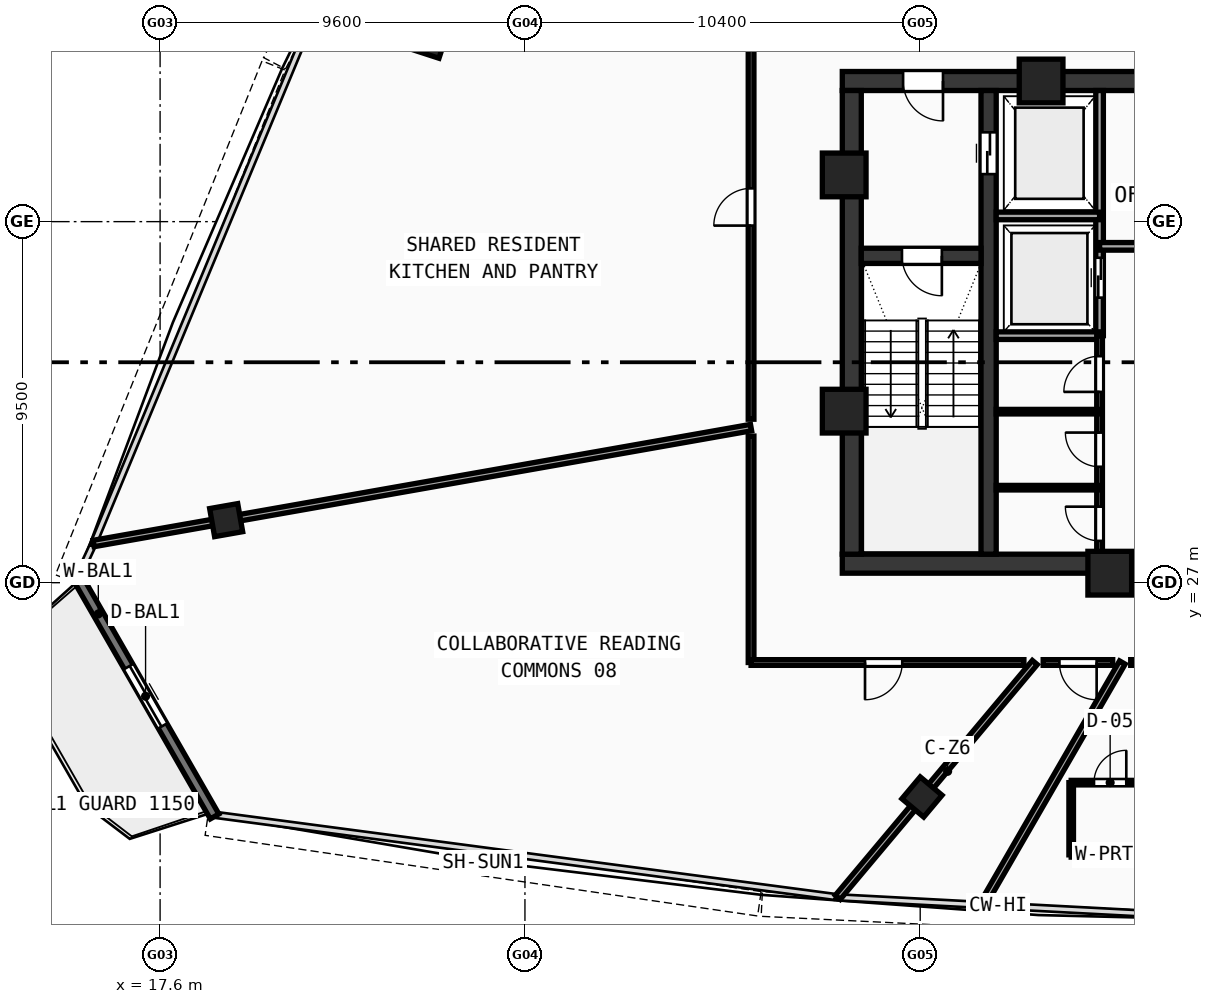
"""IFC4 building model, lengths in metres.
Left out: names, types, materials, properties, quantities, classifications, styles, units other than length and angle.
Written with IfcOpenShell. Run it as: python <this file> out.ifc"""

import sys

from ifc_helpers import new_model, si_unit, direction, frame, frame_2d, origin, origin_with_axes, origin_2d, place, context, subcontext, project, spatial, rectangle, hollow_rectangle, extrude, source, transform, mapped, element, fill, save


model = new_model("IFC4")
c1 = context("Model", 3, precision=1e-05, world=origin(), true_north=direction((0.0, 1.0)))
c2 = subcontext(c1, "Body", "Model", "MODEL_VIEW")
j1 = project(units=[si_unit("LENGTHUNIT", "METRE"), si_unit("PLANEANGLEUNIT", "RADIAN")], contexts=[c1])
p1 = place(None, origin())
s1 = spatial("IfcSite", under=j1, at=p1, CompositionType="ELEMENT")
p2 = place(p1, origin())
s2 = spatial("IfcBuilding", under=s1, at=p2, CompositionType="ELEMENT")
p3 = place(p2, frame((0.0, 0.0, 285.02)))
s3 = spatial("IfcBuildingStorey", under=s2, at=p3, CompositionType="ELEMENT", Elevation=285.02)
p4 = place(p3, frame((35.55, 27.5, 0.0), z_axis=(0.0, 0.0, 1.0), x_axis=(1.0, 0.0, 0.0)))
e1 = element("IfcWall", 1, at=p4, inside=s3, PredefinedType="SHEAR", context=c2, shape_type="SweptSolid", body=[
    extrude(rectangle(XDim=24.9, YDim=0.5, at=frame_2d((12.45, 0.0))), origin(), (0.0, 0.0, 1.0), 3.47),
])
p5 = place(p3, frame((35.55, 40.2, 0.0), z_axis=(0.0, 0.0, 1.0), x_axis=(1.0, 0.0, 0.0)))
e2 = element("IfcWall", 2, at=p5, inside=s3, PredefinedType="SHEAR", context=c2, shape_type="SweptSolid", body=[
    extrude(rectangle(XDim=11.25, YDim=0.5, at=frame_2d((5.625, 0.0))), origin(), (0.0, 0.0, 1.0), 3.47),
])
p6 = place(p5, frame((1.6, 0.0, 0.0)))
e3 = element("IfcOpeningElement", 3, at=p6, cuts=e2, PredefinedType="OPENING", context=c2, shape_type="SweptSolid", body=[
    extrude(rectangle(XDim=1.05, YDim=2.1, at=frame_2d((0.525, 1.05))), frame((0.0, 0.26, 0.0), z_axis=(0.0, -1.0, 0.0), x_axis=(1.0, 0.0, 0.0)), (0.0, 0.0, 1.0), 0.52),
])
p7 = place(p3, frame((35.8, 27.75, 0.0), z_axis=(0.0, 0.0, 1.0), x_axis=(0.0, 1.0, 0.0)))
e4 = element("IfcWall", 4, at=p7, inside=s3, PredefinedType="SHEAR", context=c2, shape_type="SweptSolid", body=[
    extrude(rectangle(XDim=12.2, YDim=0.5, at=frame_2d((6.1, 0.0))), origin(), (0.0, 0.0, 1.0), 3.47),
])
p8 = place(p3, frame((39.4, 27.75, 0.0), z_axis=(0.0, 0.0, 1.0), x_axis=(0.0, 1.0, 0.0)))
e5 = element("IfcWall", 5, at=p8, inside=s3, PredefinedType="SHEAR", context=c2, shape_type="SweptSolid", body=[
    extrude(rectangle(XDim=12.2, YDim=0.4, at=frame_2d((6.1, 0.0))), origin(), (0.0, 0.0, 1.0), 3.47),
])
p9 = place(p8, frame((10.0, 0.0, 0.0)))
e6 = element("IfcOpeningElement", 6, at=p9, cuts=e5, PredefinedType="OPENING", context=c2, shape_type="SweptSolid", body=[
    extrude(rectangle(XDim=1.1, YDim=2.1, at=frame_2d((0.55, 1.05))), frame((0.0, 0.21, 0.0), z_axis=(0.0, -1.0, 0.0), x_axis=(1.0, 0.0, 0.0)), (0.0, 0.0, 1.0), 0.42),
])
p10 = place(p3, frame((36.05, 35.6, 0.0), z_axis=(0.0, 0.0, 1.0), x_axis=(1.0, 0.0, 0.0)))
e7 = element("IfcWall", 7, at=p10, inside=s3, PredefinedType="SHEAR", context=c2, shape_type="SweptSolid", body=[
    extrude(rectangle(XDim=3.15, YDim=0.4, at=frame_2d((1.575, 0.0))), origin(), (0.0, 0.0, 1.0), 3.47),
])
p11 = place(p10, frame((1.07, 0.0, 0.0)))
e8 = element("IfcOpeningElement", 8, at=p11, cuts=e7, PredefinedType="OPENING", context=c2, shape_type="SweptSolid", body=[
    extrude(rectangle(XDim=1.05, YDim=2.1, at=frame_2d((0.525, 1.05))), frame((0.0, 0.21, 0.0), z_axis=(0.0, -1.0, 0.0), x_axis=(1.0, 0.0, 0.0)), (0.0, 0.0, 1.0), 0.42),
])
m1 = source(origin(), c2, "Body", "SweptSolid", [
    extrude(hollow_rectangle(XDim=1.15, YDim=1.15, WallThickness=0.048, at=origin_2d()), origin(), (0.0, 0.0, 1.0), 3.73),
])
for number, where, z_axis, x_axis in (
    (9, (42.588, 27.25, -0.26), (0.0, 0.0, 1.0), (1.0, 0.0, 0.0)),
    (10, (40.781, 40.2, -0.26), (0.0, 0.0, 1.0), (1.0, 0.0, 0.0)),
    (11, (35.6, 37.729, -0.26), (0.0, 0.0, 1.0), (1.0, 0.0, 0.0)),
    (12, (35.6, 31.513, -0.26), (0.0, 0.0, 1.0), (1.0, 0.0, 0.0)),
):
    element("IfcColumn", number, at=place(p3, frame(where, z_axis=z_axis, x_axis=x_axis)), inside=s3, PredefinedType="COLUMN", context=c2, shape_type="MappedRepresentation", body=[
        mapped(m1, transform((0.0, 0.0, 0.0), scale=1.0)),
    ])
m2 = source(origin(), c2, "Body", "SweptSolid", [
    extrude(hollow_rectangle(XDim=0.75, YDim=0.75, WallThickness=0.028, at=origin_2d()), origin(), (0.0, 0.0, 1.0), 3.73),
])
for number, where, z_axis, x_axis in (
    (13, (37.647, 21.362, -0.26), (0.0, 0.0, 1.0), (0.766, -0.643, 0.0)),
    (14, (24.698, 41.271, -0.26), (0.0, 0.0, 1.0), (-0.309, -0.951, 0.0)),
    (15, (19.338, 28.646, -0.26), (0.0, 0.0, 1.0), (0.174, -0.985, 0.0)),
):
    element("IfcColumn", number, at=place(p3, frame(where, z_axis=z_axis, x_axis=x_axis)), inside=s3, PredefinedType="COLUMN", context=c2, shape_type="MappedRepresentation", body=[
        mapped(m2, transform((0.0, 0.0, 0.0), scale=1.0)),
    ])
p12 = place(p3, frame((15.402, 27.174, 0.0), z_axis=(0.0, 0.0, 1.0), x_axis=(0.497929527106, -0.867217496385, 0.0)))
e16 = element("IfcWall", 16, at=p12, inside=s3, PredefinedType="STANDARD", context=c2, shape_type="SweptSolid", body=[
    extrude(rectangle(XDim=7.293, YDim=0.26, at=frame_2d((3.647, 0.0))), origin(), (0.0, 0.0, 1.0), 3.47),
])
p13 = place(p12, frame((2.747, 0.0, 0.0)))
e17 = element("IfcOpeningElement", 17, at=p13, cuts=e16, PredefinedType="OPENING", context=c2, shape_type="SweptSolid", body=[
    extrude(rectangle(XDim=1.8, YDim=2.15, at=frame_2d((0.9, 1.075))), frame((0.0, 0.14, 0.0), z_axis=(0.0, -1.0, 0.0), x_axis=(1.0, 0.0, 0.0)), (0.0, 0.0, 1.0), 0.28),
])
p14 = place(p3, frame((42.32, 33.5, 0.0), z_axis=(0.0, 0.0, 1.0), x_axis=(0.0, 1.0, 0.0)))
e18 = element("IfcWall", 18, at=p14, inside=s3, PredefinedType="SOLIDWALL", context=c2, shape_type="SweptSolid", body=[
    extrude(rectangle(XDim=6.45, YDim=0.2, at=frame_2d((3.225, 0.0))), origin(), (0.0, 0.0, 1.0), 3.47),
])
p15 = place(p14, frame((1.0, 0.0, 0.0)))
e19 = element("IfcOpeningElement", 19, at=p15, cuts=e18, PredefinedType="OPENING", context=c2, shape_type="SweptSolid", body=[
    extrude(rectangle(XDim=1.05, YDim=2.1, at=frame_2d((0.525, 1.05))), frame((0.0, 0.11, 0.0), z_axis=(0.0, -1.0, 0.0), x_axis=(1.0, 0.0, 0.0)), (0.0, 0.0, 1.0), 0.22),
])
for number, where, z_axis, x_axis in (
    (20, (39.6, 36.65, 0.0), (0.0, 0.0, 1.0), (1.0, 0.0, 0.0)),
    (21, (39.6, 33.5, 0.0), (0.0, 0.0, 1.0), (1.0, 0.0, 0.0)),
):
    element("IfcWall", number, at=place(p3, frame(where, z_axis=z_axis, x_axis=x_axis)), inside=s3, PredefinedType="SOLIDWALL", context=c2, shape_type="SweptSolid", body=[
        extrude(rectangle(XDim=2.72, YDim=0.2, at=frame_2d((1.36, 0.0))), origin(), (0.0, 0.0, 1.0), 3.47),
    ])
p16 = place(p3, frame((42.32, 35.85, 0.0), z_axis=(0.0, 0.0, 1.0), x_axis=(1.0, 0.0, 0.0)))
e22 = element("IfcWall", 22, at=p16, inside=s3, PredefinedType="SOLIDWALL", context=c2, shape_type="SweptSolid", body=[
    extrude(rectangle(XDim=4.73, YDim=0.2, at=frame_2d((2.365, 0.0))), origin(), (0.0, 0.0, 1.0), 3.47),
])
p17 = place(p16, frame((1.8, 0.0, 0.0)))
e23 = element("IfcOpeningElement", 23, at=p17, cuts=e22, PredefinedType="OPENING", context=c2, shape_type="SweptSolid", body=[
    extrude(rectangle(XDim=0.9, YDim=2.1, at=frame_2d((0.45, 1.05))), frame((0.0, 0.11, 0.0), z_axis=(0.0, -1.0, 0.0), x_axis=(1.0, 0.0, 0.0)), (0.0, 0.0, 1.0), 0.22),
])
p18 = place(p3, frame((42.32, 27.6, 0.0), z_axis=(0.0, 0.0, 1.0), x_axis=(0.0, 1.0, 0.0)))
e24 = element("IfcWall", 24, at=p18, inside=s3, PredefinedType="PARTITIONING", context=c2, shape_type="SweptSolid", body=[
    extrude(rectangle(XDim=5.9, YDim=0.15, at=frame_2d((2.95, 0.0))), origin(), (0.0, 0.0, 1.0), 3.47),
])
p19 = place(p18, frame((0.5, 0.0, 0.0)))
e25 = element("IfcOpeningElement", 25, at=p19, cuts=e24, PredefinedType="OPENING", context=c2, shape_type="SweptSolid", body=[
    extrude(rectangle(XDim=0.9, YDim=2.1, at=frame_2d((0.45, 1.05))), frame((0.0, 0.085, 0.0), z_axis=(0.0, -1.0, 0.0), x_axis=(1.0, 0.0, 0.0)), (0.0, 0.0, 1.0), 0.17),
])
p20 = place(p18, frame((2.45, 0.0, 0.0)))
e26 = element("IfcOpeningElement", 26, at=p20, cuts=e24, PredefinedType="OPENING", context=c2, shape_type="SweptSolid", body=[
    extrude(rectangle(XDim=0.9, YDim=2.1, at=frame_2d((0.45, 1.05))), frame((0.0, 0.085, 0.0), z_axis=(0.0, -1.0, 0.0), x_axis=(1.0, 0.0, 0.0)), (0.0, 0.0, 1.0), 0.17),
])
p21 = place(p18, frame((4.42, 0.0, 0.0)))
e27 = element("IfcOpeningElement", 27, at=p21, cuts=e24, PredefinedType="OPENING", context=c2, shape_type="SweptSolid", body=[
    extrude(rectangle(XDim=0.94, YDim=2.1, at=frame_2d((0.47, 1.05))), frame((0.0, 0.085, 0.0), z_axis=(0.0, -1.0, 0.0), x_axis=(1.0, 0.0, 0.0)), (0.0, 0.0, 1.0), 0.17),
])
for number, where, z_axis, x_axis in (
    (28, (39.6, 29.5, 0.0), (0.0, 0.0, 1.0), (1.0, 0.0, 0.0)),
    (29, (39.6, 31.5, 0.0), (0.0, 0.0, 1.0), (1.0, 0.0, 0.0)),
):
    element("IfcWall", number, at=place(p3, frame(where, z_axis=z_axis, x_axis=x_axis)), inside=s3, PredefinedType="PARTITIONING", context=c2, shape_type="SweptSolid", body=[
        extrude(rectangle(XDim=2.72, YDim=0.12, at=frame_2d((1.36, 0.0))), origin(), (0.0, 0.0, 1.0), 3.47),
    ])
p22 = place(p3, frame((33.15, 31.082, 0.0), z_axis=(0.0, 0.0, 1.0), x_axis=(-0.984807054696, -0.173652137966, 0.0)))
e30 = element("IfcWall", 30, at=p22, inside=s3, PredefinedType="PARTITIONING", context=c2, shape_type="SweptSolid", body=[
    extrude(rectangle(XDim=17.567, YDim=0.17, at=frame_2d((8.783, 0.0))), origin(), (0.0, 0.0, 1.0), 2.87),
])
p23 = place(p3, frame((40.616, 24.9, 0.0), z_axis=(0.0, 0.0, 1.0), x_axis=(-0.642788791497, -0.76604345146, 0.0)))
e31 = element("IfcWall", 31, at=p23, inside=s3, PredefinedType="PARTITIONING", context=c2, shape_type="SweptSolid", body=[
    extrude(rectangle(XDim=8.066, YDim=0.17, at=frame_2d((4.033, 0.0))), origin(), (0.0, 0.0, 1.0), 2.87),
])
p24 = place(p3, frame((42.919, 24.9, 0.0), z_axis=(0.0, 0.0, 1.0), x_axis=(-0.499992114976, -0.866029956157, 0.0)))
e32 = element("IfcWall", 32, at=p24, inside=s3, PredefinedType="PARTITIONING", context=c2, shape_type="SweptSolid", body=[
    extrude(rectangle(XDim=7.367, YDim=0.17, at=frame_2d((3.683, 0.0))), origin(), (0.0, 0.0, 1.0), 2.87),
])
p25 = place(p3, frame((33.15, 24.9, 0.0), z_axis=(0.0, 0.0, 1.0), x_axis=(0.0, 1.0, 0.0)))
e33 = element("IfcWall", 33, at=p25, inside=s3, PredefinedType="PARTITIONING", context=c2, shape_type="SweptSolid", body=[
    extrude(rectangle(XDim=5.958, YDim=0.15, at=frame_2d((2.979, 0.0))), origin(), (0.0, 0.0, 1.0), 3.12),
])
p26 = place(p3, frame((33.15, 31.301, 0.0), z_axis=(0.0, 0.0, 1.0), x_axis=(0.0, 1.0, 0.0)))
e34 = element("IfcWall", 34, at=p26, inside=s3, PredefinedType="PARTITIONING", context=c2, shape_type="SweptSolid", body=[
    extrude(rectangle(XDim=10.899, YDim=0.15, at=frame_2d((5.449, 0.0))), origin(), (0.0, 0.0, 1.0), 2.87),
])
p27 = place(p26, frame((5.094, 0.0, 0.0)))
e35 = element("IfcOpeningElement", 35, at=p27, cuts=e34, PredefinedType="OPENING", context=c2, shape_type="SweptSolid", body=[
    extrude(rectangle(XDim=0.98, YDim=2.12, at=frame_2d((0.49, 1.06))), frame((0.0, 0.085, 0.0), z_axis=(0.0, -1.0, 0.0), x_axis=(1.0, 0.0, 0.0)), (0.0, 0.0, 1.0), 0.17),
])
p28 = place(p3, frame((45.414, 24.9, 0.0), z_axis=(0.0, 0.0, 1.0), x_axis=(-1.0, 0.0, 0.0)))
e36 = element("IfcWall", 36, at=p28, inside=s3, PredefinedType="PARTITIONING", context=c2, shape_type="SweptSolid", body=[
    extrude(rectangle(XDim=2.275, YDim=0.15, at=frame_2d((1.138, 0.0))), origin(), (0.0, 0.0, 1.0), 3.47),
])
p29 = place(p28, frame((0.658, 0.0, 0.0)))
e37 = element("IfcOpeningElement", 37, at=p29, cuts=e36, PredefinedType="OPENING", context=c2, shape_type="SweptSolid", body=[
    extrude(rectangle(XDim=0.98, YDim=2.12, at=frame_2d((0.49, 1.06))), frame((0.0, 0.085, 0.0), z_axis=(0.0, -1.0, 0.0), x_axis=(1.0, 0.0, 0.0)), (0.0, 0.0, 1.0), 0.17),
])
p30 = place(p3, frame((42.665, 24.9, 0.0), z_axis=(0.0, 0.0, 1.0), x_axis=(-1.0, 0.0, 0.0)))
e38 = element("IfcWall", 38, at=p30, inside=s3, PredefinedType="PARTITIONING", context=c2, shape_type="SweptSolid", body=[
    extrude(rectangle(XDim=1.83, YDim=0.15, at=frame_2d((0.915, 0.0))), origin(), (0.0, 0.0, 1.0), 3.47),
])
p31 = place(p30, frame((0.423, 0.0, 0.0)))
e39 = element("IfcOpeningElement", 39, at=p31, cuts=e38, PredefinedType="OPENING", context=c2, shape_type="SweptSolid", body=[
    extrude(rectangle(XDim=0.98, YDim=2.12, at=frame_2d((0.49, 1.06))), frame((0.0, 0.085, 0.0), z_axis=(0.0, -1.0, 0.0), x_axis=(1.0, 0.0, 0.0)), (0.0, 0.0, 1.0), 0.17),
])
p32 = place(p3, frame((40.329, 24.9, 0.0), z_axis=(0.0, 0.0, 1.0), x_axis=(-1.0, 0.0, 0.0)))
e40 = element("IfcWall", 40, at=p32, inside=s3, PredefinedType="PARTITIONING", context=c2, shape_type="SweptSolid", body=[
    extrude(rectangle(XDim=7.179, YDim=0.15, at=frame_2d((3.589, 0.0))), origin(), (0.0, 0.0, 1.0), 3.12),
])
p33 = place(p32, frame((3.201, 0.0, 0.0)))
e41 = element("IfcOpeningElement", 41, at=p33, cuts=e40, PredefinedType="OPENING", context=c2, shape_type="SweptSolid", body=[
    extrude(rectangle(XDim=0.98, YDim=2.12, at=frame_2d((0.49, 1.06))), frame((0.0, 0.085, 0.0), z_axis=(0.0, -1.0, 0.0), x_axis=(1.0, 0.0, 0.0)), (0.0, 0.0, 1.0), 0.17),
])
p34 = place(p3, frame((41.573, 19.839, 0.0), z_axis=(0.0, 0.0, 1.0), x_axis=(1.0, 0.0, 0.0)))
e42 = element("IfcWall", 42, at=p34, inside=s3, PredefinedType="PARTITIONING", context=c2, shape_type="SweptSolid", body=[
    extrude(rectangle(XDim=2.05, YDim=0.12, at=frame_2d((1.025, 0.0))), origin(), (0.0, 0.0, 1.0), 3.47),
])
p35 = place(p3, frame((43.623, 21.739, 0.0), z_axis=(0.0, 0.0, 1.0), x_axis=(-1.0, 0.0, 0.0)))
e43 = element("IfcWall", 43, at=p35, inside=s3, PredefinedType="PARTITIONING", context=c2, shape_type="SweptSolid", body=[
    extrude(rectangle(XDim=2.05, YDim=0.12, at=frame_2d((1.025, 0.0))), origin(), (0.0, 0.0, 1.0), 3.47),
])
p36 = place(p35, frame((0.6, 0.0, 0.0)))
e44 = element("IfcOpeningElement", 44, at=p36, cuts=e43, PredefinedType="OPENING", context=c2, shape_type="SweptSolid", body=[
    extrude(rectangle(XDim=0.85, YDim=2.1, at=frame_2d((0.425, 1.05))), frame((0.0, 0.07, 0.0), z_axis=(0.0, -1.0, 0.0), x_axis=(1.0, 0.0, 0.0)), (0.0, 0.0, 1.0), 0.14),
])
p37 = place(p3, frame((41.573, 21.739, 0.0), z_axis=(0.0, 0.0, 1.0), x_axis=(0.0, -1.0, 0.0)))
e45 = element("IfcWall", 45, at=p37, inside=s3, PredefinedType="PARTITIONING", context=c2, shape_type="SweptSolid", body=[
    extrude(rectangle(XDim=1.9, YDim=0.12, at=frame_2d((0.95, 0.0))), origin(), (0.0, 0.0, 1.0), 2.87),
])
m3 = source(origin(), c2, "Body", "SweptSolid", [
    extrude(rectangle(XDim=1.8, YDim=2.15, at=frame_2d((0.9, 1.075))), frame((0.0, 0.025, 0.0), z_axis=(0.0, -1.0, 0.0), x_axis=(1.0, 0.0, 0.0)), (0.0, 0.0, 1.0), 0.05),
])
p38 = place(p13, origin_with_axes())
e46 = element("IfcDoor", 46, at=p38, inside=s3, OperationType="DOUBLE_DOOR_SLIDING", PredefinedType="DOOR", context=c2, shape_type="MappedRepresentation", body=[
    mapped(m3, transform((0.0, 0.0, 0.0), scale=1.0)),
])
fill(e17, e46)
m4 = source(origin(), c2, "Body", "SweptSolid", [
    extrude(rectangle(XDim=1.05, YDim=2.1, at=frame_2d((0.525, 1.05))), frame((0.0, 0.025, 0.0), z_axis=(0.0, -1.0, 0.0), x_axis=(1.0, 0.0, 0.0)), (0.0, 0.0, 1.0), 0.05),
])
p39 = place(p11, frame((1.05, 0.0, 0.0), z_axis=(0.0, 0.0, 1.0), x_axis=(-1.0, 0.0, 0.0)))
e47 = element("IfcDoor", 47, at=p39, inside=s3, OperationType="SINGLE_SWING_LEFT", PredefinedType="DOOR", context=c2, shape_type="MappedRepresentation", body=[
    mapped(m4, transform((0.0, 0.0, 0.0), scale=1.0)),
])
fill(e8, e47)
p40 = place(p6, frame((1.05, 0.0, 0.0), z_axis=(0.0, 0.0, 1.0), x_axis=(-1.0, 0.0, 0.0)))
e48 = element("IfcDoor", 48, at=p40, inside=s3, OperationType="SINGLE_SWING_LEFT", PredefinedType="DOOR", context=c2, shape_type="MappedRepresentation", body=[
    mapped(m4, transform((0.0, 0.0, 0.0), scale=1.0)),
])
fill(e3, e48)
m5 = source(origin(), c2, "Body", "SweptSolid", [
    extrude(rectangle(XDim=1.1, YDim=2.1, at=frame_2d((0.55, 1.05))), frame((0.0, 0.025, 0.0), z_axis=(0.0, -1.0, 0.0), x_axis=(1.0, 0.0, 0.0)), (0.0, 0.0, 1.0), 0.05),
])
p41 = place(p9, frame((1.1, 0.0, 0.0), z_axis=(0.0, 0.0, 1.0), x_axis=(-1.0, 0.0, 0.0)))
e49 = element("IfcDoor", 49, at=p41, inside=s3, OperationType="DOUBLE_DOOR_SLIDING", PredefinedType="DOOR", context=c2, shape_type="MappedRepresentation", body=[
    mapped(m5, transform((0.0, 0.0, 0.0), scale=1.0)),
])
fill(e6, e49)
p42 = place(p15, origin_with_axes())
e50 = element("IfcDoor", 50, at=p42, inside=s3, OperationType="DOUBLE_DOOR_SLIDING", PredefinedType="DOOR", context=c2, shape_type="MappedRepresentation", body=[
    mapped(m4, transform((0.0, 0.0, 0.0), scale=1.0)),
])
fill(e19, e50)
m6 = source(origin(), c2, "Body", "SweptSolid", [
    extrude(rectangle(XDim=0.9, YDim=2.1, at=frame_2d((0.45, 1.05))), frame((0.0, 0.025, 0.0), z_axis=(0.0, -1.0, 0.0), x_axis=(1.0, 0.0, 0.0)), (0.0, 0.0, 1.0), 0.05),
])
p43 = place(p19, origin_with_axes())
e51 = element("IfcDoor", 51, at=p43, inside=s3, OperationType="SINGLE_SWING_RIGHT", PredefinedType="DOOR", context=c2, shape_type="MappedRepresentation", body=[
    mapped(m6, transform((0.0, 0.0, 0.0), scale=1.0)),
])
fill(e25, e51)
p44 = place(p20, origin_with_axes())
e52 = element("IfcDoor", 52, at=p44, inside=s3, OperationType="SINGLE_SWING_RIGHT", PredefinedType="DOOR", context=c2, shape_type="MappedRepresentation", body=[
    mapped(m6, transform((0.0, 0.0, 0.0), scale=1.0)),
])
fill(e26, e52)
m7 = source(origin(), c2, "Body", "SweptSolid", [
    extrude(rectangle(XDim=0.94, YDim=2.1, at=frame_2d((0.47, 1.05))), frame((0.0, 0.025, 0.0), z_axis=(0.0, -1.0, 0.0), x_axis=(1.0, 0.0, 0.0)), (0.0, 0.0, 1.0), 0.05),
])
p45 = place(p21, origin_with_axes())
e53 = element("IfcDoor", 53, at=p45, inside=s3, OperationType="SINGLE_SWING_LEFT", PredefinedType="DOOR", context=c2, shape_type="MappedRepresentation", body=[
    mapped(m7, transform((0.0, 0.0, 0.0), scale=1.0)),
])
fill(e27, e53)
m8 = source(origin(), c2, "Body", "SweptSolid", [
    extrude(rectangle(XDim=0.98, YDim=2.12, at=frame_2d((0.49, 1.06))), frame((0.0, 0.025, 0.0), z_axis=(0.0, -1.0, 0.0), x_axis=(1.0, 0.0, 0.0)), (0.0, 0.0, 1.0), 0.05),
])
p46 = place(p27, origin_with_axes())
e54 = element("IfcDoor", 54, at=p46, inside=s3, OperationType="SINGLE_SWING_LEFT", PredefinedType="DOOR", context=c2, shape_type="MappedRepresentation", body=[
    mapped(m8, transform((0.0, 0.0, 0.0), scale=1.0)),
])
fill(e35, e54)
p47 = place(p33, origin_with_axes())
e55 = element("IfcDoor", 55, at=p47, inside=s3, OperationType="SINGLE_SWING_RIGHT", PredefinedType="DOOR", context=c2, shape_type="MappedRepresentation", body=[
    mapped(m8, transform((0.0, 0.0, 0.0), scale=1.0)),
])
fill(e41, e55)
p48 = place(p31, origin_with_axes())
e56 = element("IfcDoor", 56, at=p48, inside=s3, OperationType="SINGLE_SWING_LEFT", PredefinedType="DOOR", context=c2, shape_type="MappedRepresentation", body=[
    mapped(m8, transform((0.0, 0.0, 0.0), scale=1.0)),
])
fill(e39, e56)
m9 = source(origin(), c2, "Body", "SweptSolid", [
    extrude(rectangle(XDim=0.85, YDim=2.1, at=frame_2d((0.425, 1.05))), frame((0.0, 0.025, 0.0), z_axis=(0.0, -1.0, 0.0), x_axis=(1.0, 0.0, 0.0)), (0.0, 0.0, 1.0), 0.05),
])
p49 = place(p36, frame((0.85, 0.0, 0.0), z_axis=(0.0, 0.0, 1.0), x_axis=(-1.0, 0.0, 0.0)))
e57 = element("IfcDoor", 57, at=p49, inside=s3, OperationType="SINGLE_SWING_RIGHT", PredefinedType="DOOR", context=c2, shape_type="MappedRepresentation", body=[
    mapped(m9, transform((0.0, 0.0, 0.0), scale=1.0)),
])
fill(e44, e57)
save(model, sys.argv[1])
